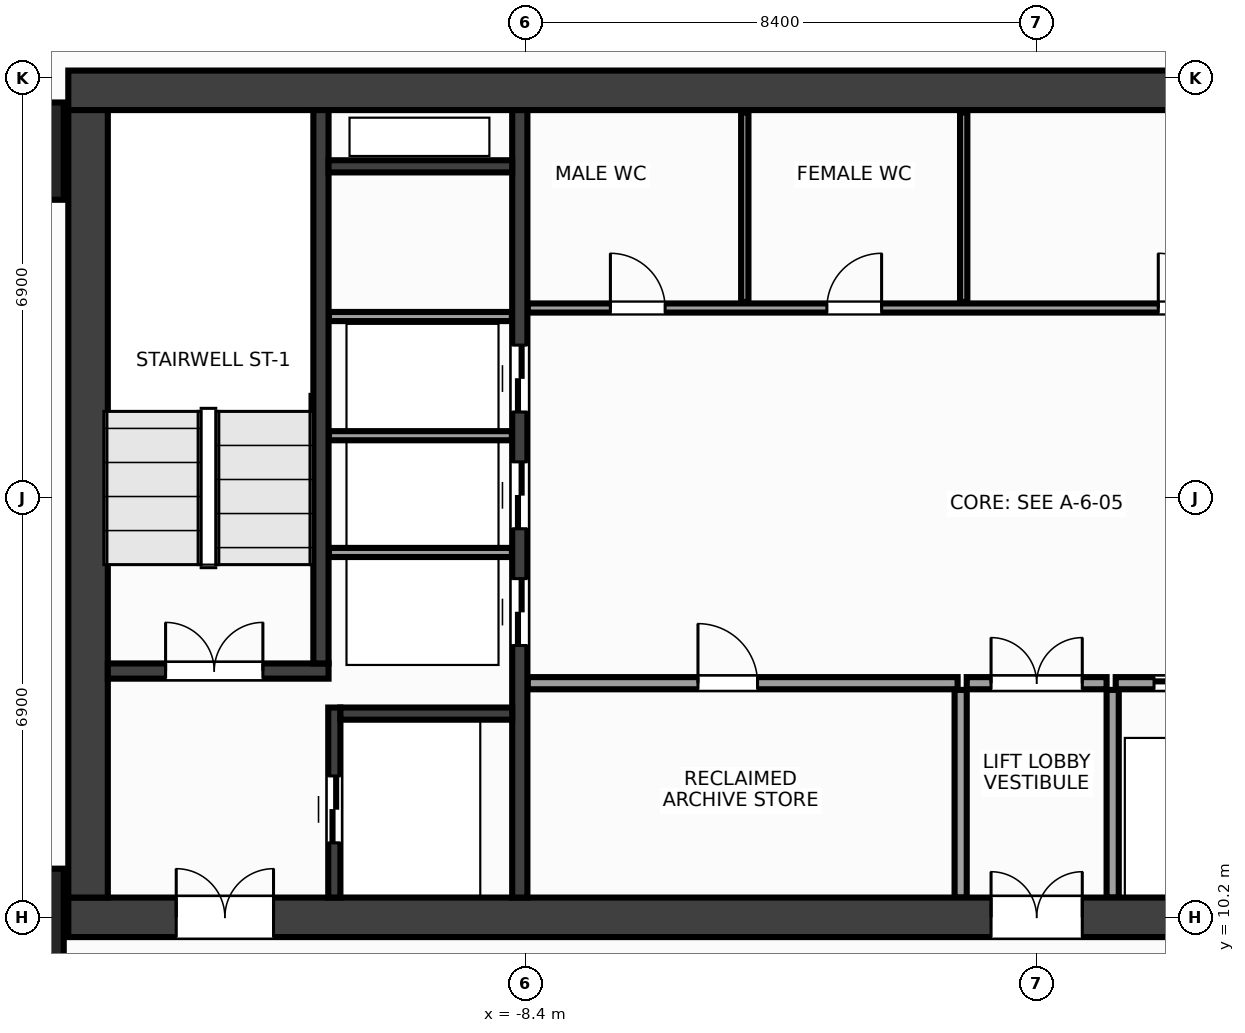
"""IFC4 building model, lengths in metres.
Left out: names, types, materials, properties, quantities, classifications, styles, units other than length and angle.
Written with IfcOpenShell. Run it as: python <this file> out.ifc"""

import sys

from ifc_helpers import new_model, si_unit, direction, frame, frame_2d, origin, origin_2d, place, context, subcontext, project, spatial, rectangle, extrude, source, transform, mapped, element, fill, save


model = new_model("IFC4")
c1 = context("Model", 3, precision=1e-05, world=origin(), true_north=direction((0.0, 1.0)))
c2 = subcontext(c1, "Body", "Model", "MODEL_VIEW")
j1 = project(units=[si_unit("LENGTHUNIT", "METRE"), si_unit("PLANEANGLEUNIT", "RADIAN")], contexts=[c1])
p1 = place(None, origin())
s1 = spatial("IfcSite", under=j1, at=p1, CompositionType="ELEMENT")
p2 = place(p1, origin())
s2 = spatial("IfcBuilding", under=s1, at=p2, CompositionType="ELEMENT")
p3 = place(p2, frame((0.0, 0.0, 149.6)))
s3 = spatial("IfcBuildingStorey", under=s2, at=p3, CompositionType="ELEMENT", Elevation=149.6)
m1 = source(origin(), c2, "Body", "SweptSolid", [
    extrude(rectangle(XDim=31.85, YDim=0.65, at=frame_2d((15.925, 0.0))), origin(), (0.0, 0.0, 1.0), 3.6),
])
p4 = place(p3, frame((-15.925, 23.8, 0.0), z_axis=(0.0, 0.0, 1.0), x_axis=(1.0, 0.0, 0.0)))
e1 = element("IfcWall", 1, at=p4, inside=s3, PredefinedType="SHEAR", context=c2, shape_type="MappedRepresentation", body=[
    mapped(m1, transform((0.0, 0.0, 0.0), x_axis=(1.0, 0.0, 0.0), y_axis=(0.0, 1.0, 0.0), z_axis=(0.0, 0.0, 1.0), scale=1.0)),
])
p5 = place(p3, frame((-15.925, 10.2, 0.0), z_axis=(0.0, 0.0, 1.0), x_axis=(1.0, 0.0, 0.0)))
e2 = element("IfcWall", 2, at=p5, inside=s3, PredefinedType="SHEAR", context=c2, shape_type="MappedRepresentation", body=[
    mapped(m1, transform((0.0, 0.0, 0.0), x_axis=(1.0, 0.0, 0.0), y_axis=(0.0, 1.0, 0.0), z_axis=(0.0, 0.0, 1.0), scale=1.0)),
])
p6 = place(p5, frame((1.775, 0.0, 0.0)))
e3 = element("IfcOpeningElement", 3, at=p6, cuts=e2, PredefinedType="OPENING", context=c2, shape_type="SweptSolid", body=[
    extrude(rectangle(XDim=1.6, YDim=2.15, at=frame_2d((0.8, 1.075))), frame((0.0, 0.337, 0.0), z_axis=(0.0, -1.0, 0.0), x_axis=(1.0, 0.0, 0.0)), (0.0, 0.0, 1.0), 0.674),
])
p7 = place(p5, frame((28.475, 0.0, 0.0)))
e4 = element("IfcOpeningElement", 4, at=p7, cuts=e2, PredefinedType="OPENING", context=c2, shape_type="SweptSolid", body=[
    extrude(rectangle(XDim=1.6, YDim=2.15, at=frame_2d((0.8, 1.075))), frame((0.0, 0.337, 0.0), z_axis=(0.0, -1.0, 0.0), x_axis=(1.0, 0.0, 0.0)), (0.0, 0.0, 1.0), 0.674),
])
p8 = place(p5, frame((15.175, 0.0, 0.0)))
e5 = element("IfcOpeningElement", 5, at=p8, cuts=e2, PredefinedType="OPENING", context=c2, shape_type="SweptSolid", body=[
    extrude(rectangle(XDim=1.5, YDim=2.2, at=frame_2d((0.75, 1.1))), frame((0.0, 0.337, 0.0), z_axis=(0.0, -1.0, 0.0), x_axis=(1.0, 0.0, 0.0)), (0.0, 0.0, 1.0), 0.674),
])
m2 = source(origin(), c2, "Body", "SweptSolid", [
    extrude(rectangle(XDim=12.95, YDim=0.65, at=frame_2d((6.475, 0.0))), origin(), (0.0, 0.0, 1.0), 3.6),
])
p9 = place(p3, frame((-15.6, 10.525, 0.0), z_axis=(0.0, 0.0, 1.0), x_axis=(0.0, 1.0, 0.0)))
e6 = element("IfcWall", 6, at=p9, inside=s3, PredefinedType="SHEAR", context=c2, shape_type="MappedRepresentation", body=[
    mapped(m2, transform((0.0, 0.0, 0.0), x_axis=(1.0, 0.0, 0.0), y_axis=(0.0, 1.0, 0.0), z_axis=(0.0, 0.0, 1.0), scale=1.0)),
])
m3 = source(origin(), c2, "Body", "SweptSolid", [
    extrude(rectangle(XDim=12.95, YDim=0.25, at=frame_2d((6.475, 0.0))), origin(), (0.0, 0.0, 1.0), 3.6),
])
p10 = place(p3, frame((-8.5, 10.525, 0.0), z_axis=(0.0, 0.0, 1.0), x_axis=(0.0, 1.0, 0.0)))
e7 = element("IfcWall", 7, at=p10, inside=s3, PredefinedType="SHEAR", context=c2, shape_type="MappedRepresentation", body=[
    mapped(m3, transform((0.0, 0.0, 0.0), x_axis=(1.0, 0.0, 0.0), y_axis=(0.0, 1.0, 0.0), z_axis=(0.0, 0.0, 1.0), scale=1.0)),
])
p11 = place(p10, frame((4.145, 0.0, 0.0)))
e8 = element("IfcOpeningElement", 8, at=p11, cuts=e7, PredefinedType="OPENING", context=c2, shape_type="SweptSolid", body=[
    extrude(rectangle(XDim=1.1, YDim=2.15, at=frame_2d((0.55, 1.075))), frame((0.0, 0.137, 0.0), z_axis=(0.0, -1.0, 0.0), x_axis=(1.0, 0.0, 0.0)), (0.0, 0.0, 1.0), 0.274),
])
p12 = place(p10, frame((6.065, 0.0, 0.0)))
e9 = element("IfcOpeningElement", 9, at=p12, cuts=e7, PredefinedType="OPENING", context=c2, shape_type="SweptSolid", body=[
    extrude(rectangle(XDim=1.1, YDim=2.15, at=frame_2d((0.55, 1.075))), frame((0.0, 0.137, 0.0), z_axis=(0.0, -1.0, 0.0), x_axis=(1.0, 0.0, 0.0)), (0.0, 0.0, 1.0), 0.274),
])
p13 = place(p10, frame((7.985, 0.0, 0.0)))
e10 = element("IfcOpeningElement", 10, at=p13, cuts=e7, PredefinedType="OPENING", context=c2, shape_type="SweptSolid", body=[
    extrude(rectangle(XDim=1.1, YDim=2.15, at=frame_2d((0.55, 1.075))), frame((0.0, 0.137, 0.0), z_axis=(0.0, -1.0, 0.0), x_axis=(1.0, 0.0, 0.0)), (0.0, 0.0, 1.0), 0.274),
])
m4 = source(origin(), c2, "Body", "SweptSolid", [
    extrude(rectangle(XDim=3.63, YDim=0.25, at=frame_2d((1.815, 0.0))), origin(), (0.0, 0.0, 1.0), 3.6),
])
p14 = place(p3, frame((-15.275, 14.25, 0.0), z_axis=(0.0, 0.0, 1.0), x_axis=(1.0, 0.0, 0.0)))
e11 = element("IfcWall", 11, at=p14, inside=s3, PredefinedType="SHEAR", context=c2, shape_type="MappedRepresentation", body=[
    mapped(m4, transform((0.0, 0.0, 0.0), x_axis=(1.0, 0.0, 0.0), y_axis=(0.0, 1.0, 0.0), z_axis=(0.0, 0.0, 1.0), scale=1.0)),
])
p15 = place(p14, frame((0.95, 0.0, 0.0)))
e12 = element("IfcOpeningElement", 12, at=p15, cuts=e11, PredefinedType="OPENING", context=c2, shape_type="SweptSolid", body=[
    extrude(rectangle(XDim=1.6, YDim=2.15, at=frame_2d((0.8, 1.075))), frame((0.0, 0.137, 0.0), z_axis=(0.0, -1.0, 0.0), x_axis=(1.0, 0.0, 0.0)), (0.0, 0.0, 1.0), 0.274),
])
m5 = source(origin(), c2, "Body", "SweptSolid", [
    extrude(rectangle(XDim=9.1, YDim=0.25, at=frame_2d((4.55, 0.0))), origin(), (0.0, 0.0, 1.0), 3.6),
])
p16 = place(p3, frame((-11.77, 14.375, 0.0), z_axis=(0.0, 0.0, 1.0), x_axis=(0.0, 1.0, 0.0)))
e13 = element("IfcWall", 13, at=p16, inside=s3, PredefinedType="SHEAR", context=c2, shape_type="MappedRepresentation", body=[
    mapped(m5, transform((0.0, 0.0, 0.0), x_axis=(1.0, 0.0, 0.0), y_axis=(0.0, 1.0, 0.0), z_axis=(0.0, 0.0, 1.0), scale=1.0)),
])
m6 = source(origin(), c2, "Body", "SweptSolid", [
    extrude(rectangle(XDim=3.125, YDim=0.2, at=frame_2d((1.562, 0.0))), origin(), (0.0, 0.0, 1.0), 3.6),
])
p17 = place(p3, frame((-11.55, 10.525, 0.0), z_axis=(0.0, 0.0, 1.0), x_axis=(0.0, 1.0, 0.0)))
e14 = element("IfcWall", 14, at=p17, inside=s3, PredefinedType="SHEAR", context=c2, shape_type="MappedRepresentation", body=[
    mapped(m6, transform((0.0, 0.0, 0.0), x_axis=(1.0, 0.0, 0.0), y_axis=(0.0, 1.0, 0.0), z_axis=(0.0, 0.0, 1.0), scale=1.0)),
])
p18 = place(p17, frame((0.9, 0.0, 0.0)))
e15 = element("IfcOpeningElement", 15, at=p18, cuts=e14, PredefinedType="OPENING", context=c2, shape_type="SweptSolid", body=[
    extrude(rectangle(XDim=1.1, YDim=2.15, at=frame_2d((0.55, 1.075))), frame((0.0, 0.112, 0.0), z_axis=(0.0, -1.0, 0.0), x_axis=(1.0, 0.0, 0.0)), (0.0, 0.0, 1.0), 0.224),
])
m7 = source(origin(), c2, "Body", "SweptSolid", [
    extrude(rectangle(XDim=2.825, YDim=0.2, at=frame_2d((1.413, 0.0))), origin(), (0.0, 0.0, 1.0), 3.6),
])
p19 = place(p3, frame((-11.45, 13.55, 0.0), z_axis=(0.0, 0.0, 1.0), x_axis=(1.0, 0.0, 0.0)))
e16 = element("IfcWall", 16, at=p19, inside=s3, PredefinedType="SHEAR", context=c2, shape_type="MappedRepresentation", body=[
    mapped(m7, transform((0.0, 0.0, 0.0), x_axis=(1.0, 0.0, 0.0), y_axis=(0.0, 1.0, 0.0), z_axis=(0.0, 0.0, 1.0), scale=1.0)),
])
m8 = source(origin(), c2, "Body", "SweptSolid", [
    extrude(rectangle(XDim=3.02, YDim=0.2, at=frame_2d((1.51, 0.0))), origin(), (0.0, 0.0, 1.0), 3.6),
])
p20 = place(p3, frame((-11.645, 22.55, 0.0), z_axis=(0.0, 0.0, 1.0), x_axis=(1.0, 0.0, 0.0)))
e17 = element("IfcWall", 17, at=p20, inside=s3, PredefinedType="SHEAR", context=c2, shape_type="MappedRepresentation", body=[
    mapped(m8, transform((0.0, 0.0, 0.0), x_axis=(1.0, 0.0, 0.0), y_axis=(0.0, 1.0, 0.0), z_axis=(0.0, 0.0, 1.0), scale=1.0)),
])
m9 = source(origin(), c2, "Body", "SweptSolid", [
    extrude(rectangle(XDim=1.6, YDim=1.6, at=origin_2d()), origin(), (0.0, 0.0, 1.0), 3.6),
])
for number, where, z_axis, x_axis in (
    (18, (-16.8, 10.2, 0.0), (0.0, 0.0, 1.0), (1.0, 0.0, 0.0)),
    (19, (-16.8, 22.8, 0.0), (0.0, 0.0, 1.0), (1.0, 0.0, 0.0)),
):
    element("IfcColumn", number, at=place(p3, frame(where, z_axis=z_axis, x_axis=x_axis)), inside=s3, PredefinedType="COLUMN", context=c2, shape_type="MappedRepresentation", body=[
        mapped(m9, transform((0.0, 0.0, 0.0), x_axis=(1.0, 0.0, 0.0), y_axis=(0.0, 1.0, 0.0), z_axis=(0.0, 0.0, 1.0), scale=1.0)),
    ])
m10 = source(origin(), c2, "Body", "SweptSolid", [
    extrude(rectangle(XDim=3.01, YDim=0.15, at=frame_2d((1.505, 0.0))), origin(), (0.0, 0.0, 1.0), 3.38),
])
for number, where, z_axis, x_axis in (
    (20, (-11.64, 16.2, 0.0), (0.0, 0.0, 1.0), (1.0, 0.0, 0.0)),
    (21, (-11.64, 18.12, 0.0), (0.0, 0.0, 1.0), (1.0, 0.0, 0.0)),
    (22, (-11.64, 20.08, 0.0), (0.0, 0.0, 1.0), (1.0, 0.0, 0.0)),
):
    element("IfcWall", number, at=place(p3, frame(where, z_axis=z_axis, x_axis=x_axis)), inside=s3, PredefinedType="PARTITIONING", context=c2, shape_type="MappedRepresentation", body=[
        mapped(m10, transform((0.0, 0.0, 0.0), x_axis=(1.0, 0.0, 0.0), y_axis=(0.0, 1.0, 0.0), z_axis=(0.0, 0.0, 1.0), scale=1.0)),
    ])
m11 = source(origin(), c2, "Body", "SweptSolid", [
    extrude(rectangle(XDim=7.07, YDim=0.2, at=frame_2d((3.535, 0.0))), origin(), (0.0, 0.0, 1.0), 3.38),
])
p21 = place(p3, frame((-8.37, 14.05, 0.0), z_axis=(0.0, 0.0, 1.0), x_axis=(1.0, 0.0, 0.0)))
e23 = element("IfcWall", 23, at=p21, inside=s3, PredefinedType="PARTITIONING", context=c2, shape_type="MappedRepresentation", body=[
    mapped(m11, transform((0.0, 0.0, 0.0), x_axis=(1.0, 0.0, 0.0), y_axis=(0.0, 1.0, 0.0), z_axis=(0.0, 0.0, 1.0), scale=1.0)),
])
p22 = place(p21, frame((2.8, 0.0, 0.0)))
e24 = element("IfcOpeningElement", 24, at=p22, cuts=e23, PredefinedType="OPENING", context=c2, shape_type="SweptSolid", body=[
    extrude(rectangle(XDim=0.98, YDim=2.15, at=frame_2d((0.49, 1.075))), frame((0.0, 0.112, 0.0), z_axis=(0.0, -1.0, 0.0), x_axis=(1.0, 0.0, 0.0)), (0.0, 0.0, 1.0), 0.224),
])
p23 = place(p3, frame((1.3, 14.05, 0.0), z_axis=(0.0, 0.0, 1.0), x_axis=(1.0, 0.0, 0.0)))
e25 = element("IfcWall", 25, at=p23, inside=s3, PredefinedType="PARTITIONING", context=c2, shape_type="MappedRepresentation", body=[
    mapped(m11, transform((0.0, 0.0, 0.0), x_axis=(1.0, 0.0, 0.0), y_axis=(0.0, 1.0, 0.0), z_axis=(0.0, 0.0, 1.0), scale=1.0)),
])
p24 = place(p23, frame((0.63, 0.0, 0.0)))
e26 = element("IfcOpeningElement", 26, at=p24, cuts=e25, PredefinedType="OPENING", context=c2, shape_type="SweptSolid", body=[
    extrude(rectangle(XDim=1.1, YDim=2.15, at=frame_2d((0.55, 1.075))), frame((0.0, 0.112, 0.0), z_axis=(0.0, -1.0, 0.0), x_axis=(1.0, 0.0, 0.0)), (0.0, 0.0, 1.0), 0.224),
])
p25 = place(p23, frame((2.98, 0.0, 0.0)))
e27 = element("IfcOpeningElement", 27, at=p25, cuts=e25, PredefinedType="OPENING", context=c2, shape_type="SweptSolid", body=[
    extrude(rectangle(XDim=1.1, YDim=2.15, at=frame_2d((0.55, 1.075))), frame((0.0, 0.112, 0.0), z_axis=(0.0, -1.0, 0.0), x_axis=(1.0, 0.0, 0.0)), (0.0, 0.0, 1.0), 0.224),
])
p26 = place(p23, frame((5.33, 0.0, 0.0)))
e28 = element("IfcOpeningElement", 28, at=p26, cuts=e25, PredefinedType="OPENING", context=c2, shape_type="SweptSolid", body=[
    extrude(rectangle(XDim=1.1, YDim=2.15, at=frame_2d((0.55, 1.075))), frame((0.0, 0.112, 0.0), z_axis=(0.0, -1.0, 0.0), x_axis=(1.0, 0.0, 0.0)), (0.0, 0.0, 1.0), 0.224),
])
m12 = source(origin(), c2, "Body", "SweptSolid", [
    extrude(rectangle(XDim=3.415, YDim=0.2, at=frame_2d((1.708, 0.0))), origin(), (0.0, 0.0, 1.0), 3.38),
])
for number, where, z_axis, x_axis in (
    (29, (-1.25, 10.525, 0.0), (0.0, 0.0, 1.0), (0.0, 1.0, 0.0)),
    (30, (1.25, 10.525, 0.0), (0.0, 0.0, 1.0), (0.0, 1.0, 0.0)),
):
    element("IfcWall", number, at=place(p3, frame(where, z_axis=z_axis, x_axis=x_axis)), inside=s3, PredefinedType="PARTITIONING", context=c2, shape_type="MappedRepresentation", body=[
        mapped(m12, transform((0.0, 0.0, 0.0), x_axis=(1.0, 0.0, 0.0), y_axis=(0.0, 1.0, 0.0), z_axis=(0.0, 0.0, 1.0), scale=1.0)),
    ])
m13 = source(origin(), c2, "Body", "SweptSolid", [
    extrude(rectangle(XDim=2.3, YDim=0.2, at=frame_2d((1.15, 0.0))), origin(), (0.0, 0.0, 1.0), 3.38),
])
p27 = place(p3, frame((-1.15, 14.05, 0.0), z_axis=(0.0, 0.0, 1.0), x_axis=(1.0, 0.0, 0.0)))
e31 = element("IfcWall", 31, at=p27, inside=s3, PredefinedType="PARTITIONING", context=c2, shape_type="MappedRepresentation", body=[
    mapped(m13, transform((0.0, 0.0, 0.0), x_axis=(1.0, 0.0, 0.0), y_axis=(0.0, 1.0, 0.0), z_axis=(0.0, 0.0, 1.0), scale=1.0)),
])
p28 = place(p27, frame((0.4, 0.0, 0.0)))
e32 = element("IfcOpeningElement", 32, at=p28, cuts=e31, PredefinedType="OPENING", context=c2, shape_type="SweptSolid", body=[
    extrude(rectangle(XDim=1.5, YDim=2.2, at=frame_2d((0.75, 1.1))), frame((0.0, 0.112, 0.0), z_axis=(0.0, -1.0, 0.0), x_axis=(1.0, 0.0, 0.0)), (0.0, 0.0, 1.0), 0.224),
])
m14 = source(origin(), c2, "Body", "SweptSolid", [
    extrude(rectangle(XDim=14.59, YDim=0.15, at=frame_2d((7.295, 0.0))), origin(), (0.0, 0.0, 1.0), 3.38),
])
p29 = place(p3, frame((-8.37, 20.22, 0.0), z_axis=(0.0, 0.0, 1.0), x_axis=(1.0, 0.0, 0.0)))
e33 = element("IfcWall", 33, at=p29, inside=s3, PredefinedType="PARTITIONING", context=c2, shape_type="MappedRepresentation", body=[
    mapped(m14, transform((0.0, 0.0, 0.0), x_axis=(1.0, 0.0, 0.0), y_axis=(0.0, 1.0, 0.0), z_axis=(0.0, 0.0, 1.0), scale=1.0)),
])
p30 = place(p29, frame((1.36, 0.0, 0.0)))
e34 = element("IfcOpeningElement", 34, at=p30, cuts=e33, PredefinedType="OPENING", context=c2, shape_type="SweptSolid", body=[
    extrude(rectangle(XDim=0.9, YDim=2.15, at=frame_2d((0.45, 1.075))), frame((0.0, 0.087, 0.0), z_axis=(0.0, -1.0, 0.0), x_axis=(1.0, 0.0, 0.0)), (0.0, 0.0, 1.0), 0.174),
])
p31 = place(p29, frame((4.92, 0.0, 0.0)))
e35 = element("IfcOpeningElement", 35, at=p31, cuts=e33, PredefinedType="OPENING", context=c2, shape_type="SweptSolid", body=[
    extrude(rectangle(XDim=0.9, YDim=2.15, at=frame_2d((0.45, 1.075))), frame((0.0, 0.087, 0.0), z_axis=(0.0, -1.0, 0.0), x_axis=(1.0, 0.0, 0.0)), (0.0, 0.0, 1.0), 0.174),
])
p32 = place(p29, frame((10.37, 0.0, 0.0)))
e36 = element("IfcOpeningElement", 36, at=p32, cuts=e33, PredefinedType="OPENING", context=c2, shape_type="SweptSolid", body=[
    extrude(rectangle(XDim=0.9, YDim=2.15, at=frame_2d((0.45, 1.075))), frame((0.0, 0.087, 0.0), z_axis=(0.0, -1.0, 0.0), x_axis=(1.0, 0.0, 0.0)), (0.0, 0.0, 1.0), 0.174),
])
m15 = source(origin(), c2, "Body", "SweptSolid", [
    extrude(rectangle(XDim=3.115, YDim=0.12, at=frame_2d((1.558, 0.0))), origin(), (0.0, 0.0, 1.0), 3.38),
])
for number, where, z_axis, x_axis in (
    (37, (-4.8, 20.32, 0.0), (0.0, 0.0, 1.0), (0.0, 1.0, 0.0)),
    (38, (-1.2, 20.32, 0.0), (0.0, 0.0, 1.0), (0.0, 1.0, 0.0)),
):
    element("IfcWall", number, at=place(p3, frame(where, z_axis=z_axis, x_axis=x_axis)), inside=s3, PredefinedType="PARTITIONING", context=c2, shape_type="MappedRepresentation", body=[
        mapped(m15, transform((0.0, 0.0, 0.0), x_axis=(1.0, 0.0, 0.0), y_axis=(0.0, 1.0, 0.0), z_axis=(0.0, 0.0, 1.0), scale=1.0)),
    ])
m16 = source(origin(), c2, "Body", "SweptSolid", [
    extrude(rectangle(XDim=1.6, YDim=2.15, at=frame_2d((0.8, 1.075))), frame((0.0, 0.025, 0.0), z_axis=(0.0, -1.0, 0.0), x_axis=(1.0, 0.0, 0.0)), (0.0, 0.0, 1.0), 0.05),
])
p33 = place(p15, origin())
e39 = element("IfcDoor", 39, at=p33, inside=s3, OperationType="DOUBLE_DOOR_SINGLE_SWING", PredefinedType="DOOR", context=c2, shape_type="MappedRepresentation", body=[
    mapped(m16, transform((0.0, 0.0, 0.0), x_axis=(1.0, 0.0, 0.0), y_axis=(0.0, 1.0, 0.0), z_axis=(0.0, 0.0, 1.0), scale=1.0)),
])
fill(e12, e39)
p34 = place(p6, origin())
e40 = element("IfcDoor", 40, at=p34, inside=s3, OperationType="DOUBLE_DOOR_SINGLE_SWING", PredefinedType="DOOR", context=c2, shape_type="MappedRepresentation", body=[
    mapped(m16, transform((0.0, 0.0, 0.0), x_axis=(1.0, 0.0, 0.0), y_axis=(0.0, 1.0, 0.0), z_axis=(0.0, 0.0, 1.0), scale=1.0)),
])
fill(e3, e40)
m17 = source(origin(), c2, "Body", "SweptSolid", [
    extrude(rectangle(XDim=1.1, YDim=2.15, at=frame_2d((0.55, 1.075))), frame((0.0, 0.025, 0.0), z_axis=(0.0, -1.0, 0.0), x_axis=(1.0, 0.0, 0.0)), (0.0, 0.0, 1.0), 0.05),
])
p35 = place(p18, origin())
e41 = element("IfcDoor", 41, at=p35, inside=s3, OperationType="DOUBLE_DOOR_SLIDING", PredefinedType="DOOR", context=c2, shape_type="MappedRepresentation", body=[
    mapped(m17, transform((0.0, 0.0, 0.0), x_axis=(1.0, 0.0, 0.0), y_axis=(0.0, 1.0, 0.0), z_axis=(0.0, 0.0, 1.0), scale=1.0)),
])
fill(e15, e41)
p36 = place(p11, origin())
e42 = element("IfcDoor", 42, at=p36, inside=s3, OperationType="DOUBLE_DOOR_SLIDING", PredefinedType="DOOR", context=c2, shape_type="MappedRepresentation", body=[
    mapped(m17, transform((0.0, 0.0, 0.0), x_axis=(1.0, 0.0, 0.0), y_axis=(0.0, 1.0, 0.0), z_axis=(0.0, 0.0, 1.0), scale=1.0)),
])
fill(e8, e42)
p37 = place(p12, origin())
e43 = element("IfcDoor", 43, at=p37, inside=s3, OperationType="DOUBLE_DOOR_SLIDING", PredefinedType="DOOR", context=c2, shape_type="MappedRepresentation", body=[
    mapped(m17, transform((0.0, 0.0, 0.0), x_axis=(1.0, 0.0, 0.0), y_axis=(0.0, 1.0, 0.0), z_axis=(0.0, 0.0, 1.0), scale=1.0)),
])
fill(e9, e43)
p38 = place(p13, origin())
e44 = element("IfcDoor", 44, at=p38, inside=s3, OperationType="DOUBLE_DOOR_SLIDING", PredefinedType="DOOR", context=c2, shape_type="MappedRepresentation", body=[
    mapped(m17, transform((0.0, 0.0, 0.0), x_axis=(1.0, 0.0, 0.0), y_axis=(0.0, 1.0, 0.0), z_axis=(0.0, 0.0, 1.0), scale=1.0)),
])
fill(e10, e44)
m18 = source(origin(), c2, "Body", "SweptSolid", [
    extrude(rectangle(XDim=0.98, YDim=2.15, at=frame_2d((0.49, 1.075))), frame((0.0, 0.025, 0.0), z_axis=(0.0, -1.0, 0.0), x_axis=(1.0, 0.0, 0.0)), (0.0, 0.0, 1.0), 0.05),
])
p39 = place(p22, origin())
e45 = element("IfcDoor", 45, at=p39, inside=s3, OperationType="SINGLE_SWING_LEFT", PredefinedType="DOOR", context=c2, shape_type="MappedRepresentation", body=[
    mapped(m18, transform((0.0, 0.0, 0.0), x_axis=(1.0, 0.0, 0.0), y_axis=(0.0, 1.0, 0.0), z_axis=(0.0, 0.0, 1.0), scale=1.0)),
])
fill(e24, e45)
p40 = place(p24, origin())
e46 = element("IfcDoor", 46, at=p40, inside=s3, OperationType="DOUBLE_DOOR_SLIDING", PredefinedType="DOOR", context=c2, shape_type="MappedRepresentation", body=[
    mapped(m17, transform((0.0, 0.0, 0.0), x_axis=(1.0, 0.0, 0.0), y_axis=(0.0, 1.0, 0.0), z_axis=(0.0, 0.0, 1.0), scale=1.0)),
])
fill(e26, e46)
m19 = source(origin(), c2, "Body", "SweptSolid", [
    extrude(rectangle(XDim=1.5, YDim=2.2, at=frame_2d((0.75, 1.1))), frame((0.0, 0.025, 0.0), z_axis=(0.0, -1.0, 0.0), x_axis=(1.0, 0.0, 0.0)), (0.0, 0.0, 1.0), 0.05),
])
p41 = place(p28, origin())
e47 = element("IfcDoor", 47, at=p41, inside=s3, OperationType="DOUBLE_DOOR_SINGLE_SWING", PredefinedType="DOOR", context=c2, shape_type="MappedRepresentation", body=[
    mapped(m19, transform((0.0, 0.0, 0.0), x_axis=(1.0, 0.0, 0.0), y_axis=(0.0, 1.0, 0.0), z_axis=(0.0, 0.0, 1.0), scale=1.0)),
])
fill(e32, e47)
p42 = place(p8, origin())
e48 = element("IfcDoor", 48, at=p42, inside=s3, OperationType="DOUBLE_DOOR_SINGLE_SWING", PredefinedType="DOOR", context=c2, shape_type="MappedRepresentation", body=[
    mapped(m19, transform((0.0, 0.0, 0.0), x_axis=(1.0, 0.0, 0.0), y_axis=(0.0, 1.0, 0.0), z_axis=(0.0, 0.0, 1.0), scale=1.0)),
])
fill(e5, e48)
m20 = source(origin(), c2, "Body", "SweptSolid", [
    extrude(rectangle(XDim=0.9, YDim=2.15, at=frame_2d((0.45, 1.075))), frame((0.0, 0.025, 0.0), z_axis=(0.0, -1.0, 0.0), x_axis=(1.0, 0.0, 0.0)), (0.0, 0.0, 1.0), 0.05),
])
p43 = place(p30, origin())
e49 = element("IfcDoor", 49, at=p43, inside=s3, OperationType="SINGLE_SWING_LEFT", PredefinedType="DOOR", context=c2, shape_type="MappedRepresentation", body=[
    mapped(m20, transform((0.0, 0.0, 0.0), x_axis=(1.0, 0.0, 0.0), y_axis=(0.0, 1.0, 0.0), z_axis=(0.0, 0.0, 1.0), scale=1.0)),
])
fill(e34, e49)
p44 = place(p31, origin())
e50 = element("IfcDoor", 50, at=p44, inside=s3, OperationType="SINGLE_SWING_RIGHT", PredefinedType="DOOR", context=c2, shape_type="MappedRepresentation", body=[
    mapped(m20, transform((0.0, 0.0, 0.0), x_axis=(1.0, 0.0, 0.0), y_axis=(0.0, 1.0, 0.0), z_axis=(0.0, 0.0, 1.0), scale=1.0)),
])
fill(e35, e50)
p45 = place(p32, origin())
e51 = element("IfcDoor", 51, at=p45, inside=s3, OperationType="SINGLE_SWING_LEFT", PredefinedType="DOOR", context=c2, shape_type="MappedRepresentation", body=[
    mapped(m20, transform((0.0, 0.0, 0.0), x_axis=(1.0, 0.0, 0.0), y_axis=(0.0, 1.0, 0.0), z_axis=(0.0, 0.0, 1.0), scale=1.0)),
])
fill(e36, e51)
save(model, sys.argv[1])
